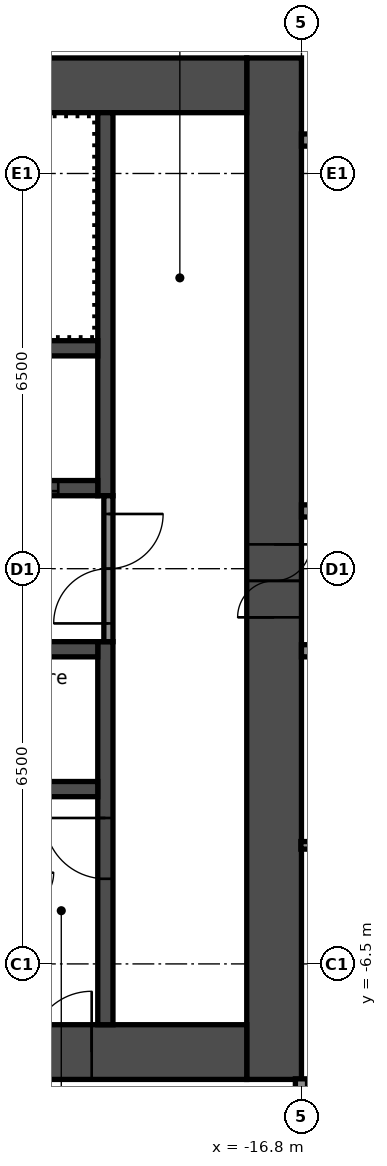
"""IFC4 building model, lengths in metres.
Left out: names, types, materials, properties, quantities, classifications, styles, units other than length and angle.
Written with IfcOpenShell. Run it as: python <this file> out.ifc"""

import sys

from ifc_helpers import new_model, si_unit, direction, frame, frame_2d, origin, place, context, subcontext, project, spatial, rectangle, extrude, element, fill, save


model = new_model("IFC4")
c1 = context("Model", 3, precision=1e-05, world=origin(), true_north=direction((0.0, 1.0)))
c2 = subcontext(c1, "Body", "Model", "MODEL_VIEW")
j1 = project(units=[si_unit("LENGTHUNIT", "METRE"), si_unit("PLANEANGLEUNIT", "RADIAN")], contexts=[c1])
p1 = place(None, origin())
s1 = spatial("IfcSite", under=j1, at=p1, CompositionType="ELEMENT")
p2 = place(p1, origin())
s2 = spatial("IfcBuilding", under=s1, at=p2, CompositionType="ELEMENT")
p3 = place(p2, frame((0.0, 0.0, 104.2)))
s3 = spatial("IfcBuildingStorey", under=s2, at=p3, CompositionType="ELEMENT", Elevation=104.2)
p4 = place(p3, frame((-17.25, -8.4, 0.0), z_axis=(0.0, 0.0, 1.0), x_axis=(0.0, 1.0, 0.0)))
e1 = element("IfcWall", 1, at=p4, inside=s3, PredefinedType="SHEAR", context=c2, shape_type="SweptSolid", body=[
    extrude(rectangle(XDim=16.8, YDim=0.9, at=frame_2d((8.4, 0.0))), origin(), (0.0, 0.0, 1.0), 2.8),
])
p5 = place(p4, frame((7.6, 0.0, 0.0)))
e2 = element("IfcOpeningElement", 2, at=p5, cuts=e1, PredefinedType="OPENING", context=c2, shape_type="SweptSolid", body=[
    extrude(rectangle(XDim=1.2, YDim=2.1, at=frame_2d((0.6, 1.05))), frame((0.0, 0.46, 0.0), z_axis=(0.0, -1.0, 0.0), x_axis=(1.0, 0.0, 0.0)), (0.0, 0.0, 1.0), 0.92),
])
p6 = place(p3, frame((-32.7, 7.95, 0.0), z_axis=(0.0, 0.0, 1.0), x_axis=(1.0, 0.0, 0.0)))
e3 = element("IfcWall", 3, at=p6, inside=s3, PredefinedType="SHEAR", context=c2, shape_type="SweptSolid", body=[
    extrude(rectangle(XDim=15.0, YDim=0.9, at=frame_2d((7.5, 0.0))), origin(), (0.0, 0.0, 1.0), 2.8),
])
p7 = place(p6, frame((3.4, 0.0, 0.0)))
e4 = element("IfcOpeningElement", 4, at=p7, cuts=e3, PredefinedType="OPENING", context=c2, shape_type="SweptSolid", body=[
    extrude(rectangle(XDim=1.2, YDim=2.1, at=frame_2d((0.6, 1.05))), frame((0.0, 0.46, 0.0), z_axis=(0.0, -1.0, 0.0), x_axis=(1.0, 0.0, 0.0)), (0.0, 0.0, 1.0), 0.92),
])
p8 = place(p6, frame((0.75, 0.0, 0.0)))
e5 = element("IfcOpeningElement", 5, at=p8, cuts=e3, PredefinedType="OPENING", context=c2, shape_type="SweptSolid", body=[
    extrude(rectangle(XDim=0.9, YDim=2.1, at=frame_2d((0.45, 1.05))), frame((0.0, 0.46, 0.0), z_axis=(0.0, -1.0, 0.0), x_axis=(1.0, 0.0, 0.0)), (0.0, 0.0, 1.0), 0.92),
])
p9 = place(p3, frame((-32.7, -7.95, 0.0), z_axis=(0.0, 0.0, 1.0), x_axis=(1.0, 0.0, 0.0)))
e6 = element("IfcWall", 6, at=p9, inside=s3, PredefinedType="SHEAR", context=c2, shape_type="SweptSolid", body=[
    extrude(rectangle(XDim=15.0, YDim=0.9, at=frame_2d((7.5, 0.0))), origin(), (0.0, 0.0, 1.0), 2.8),
])
p10 = place(p9, frame((11.45, 0.0, 0.0)))
e7 = element("IfcOpeningElement", 7, at=p10, cuts=e6, PredefinedType="OPENING", context=c2, shape_type="SweptSolid", body=[
    extrude(rectangle(XDim=1.0, YDim=2.1, at=frame_2d((0.5, 1.05))), frame((0.0, 0.46, 0.0), z_axis=(0.0, -1.0, 0.0), x_axis=(1.0, 0.0, 0.0)), (0.0, 0.0, 1.0), 0.92),
])
p11 = place(p3, frame((-20.025, 1.2, 0.0), z_axis=(0.0, 0.0, 1.0), x_axis=(0.0, 1.0, 0.0)))
e8 = element("IfcWall", 8, at=p11, inside=s3, PredefinedType="SHEAR", context=c2, shape_type="SweptSolid", body=[
    extrude(rectangle(XDim=6.3, YDim=0.25, at=frame_2d((3.15, 0.0))), origin(), (0.0, 0.0, 1.0), 2.8),
])
p12 = place(p3, frame((-20.025, -7.5, 0.0), z_axis=(0.0, 0.0, 1.0), x_axis=(0.0, 1.0, 0.0)))
e9 = element("IfcWall", 9, at=p12, inside=s3, PredefinedType="SHEAR", context=c2, shape_type="SweptSolid", body=[
    extrude(rectangle(XDim=6.3, YDim=0.25, at=frame_2d((3.15, 0.0))), origin(), (0.0, 0.0, 1.0), 2.8),
])
p13 = place(p12, frame((2.4, 0.0, 0.0)))
e10 = element("IfcOpeningElement", 10, at=p13, cuts=e9, PredefinedType="OPENING", context=c2, shape_type="SweptSolid", body=[
    extrude(rectangle(XDim=1.0, YDim=2.1, at=frame_2d((0.5, 1.05))), frame((0.0, 0.135, 0.0), z_axis=(0.0, -1.0, 0.0), x_axis=(1.0, 0.0, 0.0)), (0.0, 0.0, 1.0), 0.27),
])
p14 = place(p3, frame((-27.65, 1.325, 0.0), z_axis=(0.0, 0.0, 1.0), x_axis=(1.0, 0.0, 0.0)))
e11 = element("IfcWall", 11, at=p14, inside=s3, PredefinedType="SHEAR", context=c2, shape_type="SweptSolid", body=[
    extrude(rectangle(XDim=7.5, YDim=0.25, at=frame_2d((3.75, 0.0))), origin(), (0.0, 0.0, 1.0), 2.8),
])
p15 = place(p14, frame((5.75, 0.0, 0.0)))
e12 = element("IfcOpeningElement", 12, at=p15, cuts=e11, PredefinedType="OPENING", context=c2, shape_type="SweptSolid", body=[
    extrude(rectangle(XDim=1.1, YDim=2.1, at=frame_2d((0.55, 1.05))), frame((0.0, 0.135, 0.0), z_axis=(0.0, -1.0, 0.0), x_axis=(1.0, 0.0, 0.0)), (0.0, 0.0, 1.0), 0.27),
])
p16 = place(p14, frame((3.35, 0.0, 0.0)))
e13 = element("IfcOpeningElement", 13, at=p16, cuts=e11, PredefinedType="OPENING", context=c2, shape_type="SweptSolid", body=[
    extrude(rectangle(XDim=1.1, YDim=2.1, at=frame_2d((0.55, 1.05))), frame((0.0, 0.135, 0.0), z_axis=(0.0, -1.0, 0.0), x_axis=(1.0, 0.0, 0.0)), (0.0, 0.0, 1.0), 0.27),
])
p17 = place(p14, frame((0.95, 0.0, 0.0)))
e14 = element("IfcOpeningElement", 14, at=p17, cuts=e11, PredefinedType="OPENING", context=c2, shape_type="SweptSolid", body=[
    extrude(rectangle(XDim=1.1, YDim=2.1, at=frame_2d((0.55, 1.05))), frame((0.0, 0.135, 0.0), z_axis=(0.0, -1.0, 0.0), x_axis=(1.0, 0.0, 0.0)), (0.0, 0.0, 1.0), 0.27),
])
for number, where, z_axis, x_axis in (
    (15, (-27.65, 3.625, 0.0), (0.0, 0.0, 1.0), (1.0, 0.0, 0.0)),
    (16, (-27.65, -1.325, 0.0), (0.0, 0.0, 1.0), (1.0, 0.0, 0.0)),
    (17, (-27.65, -3.625, 0.0), (0.0, 0.0, 1.0), (1.0, 0.0, 0.0)),
):
    element("IfcWall", number, at=place(p3, frame(where, z_axis=z_axis, x_axis=x_axis)), inside=s3, PredefinedType="SHEAR", context=c2, shape_type="SweptSolid", body=[
        extrude(rectangle(XDim=7.5, YDim=0.25, at=frame_2d((3.75, 0.0))), origin(), (0.0, 0.0, 1.0), 2.8),
    ])
p18 = place(p3, frame((-19.975, -1.2, 0.0), z_axis=(0.0, 0.0, 1.0), x_axis=(0.0, 1.0, 0.0)))
e18 = element("IfcWall", 18, at=p18, inside=s3, PredefinedType="PARTITIONING", context=c2, shape_type="SweptSolid", body=[
    extrude(rectangle(XDim=2.4, YDim=0.15, at=frame_2d((1.2, 0.0))), origin(), (0.0, 0.0, 1.0), 2.8),
])
p19 = place(p18, frame((0.3, 0.0, 0.0)))
e19 = element("IfcOpeningElement", 19, at=p19, cuts=e18, PredefinedType="OPENING", context=c2, shape_type="SweptSolid", body=[
    extrude(rectangle(XDim=1.8, YDim=2.1, at=frame_2d((0.9, 1.05))), frame((0.0, 0.085, 0.0), z_axis=(0.0, -1.0, 0.0), x_axis=(1.0, 0.0, 0.0)), (0.0, 0.0, 1.0), 0.17),
])
p20 = place(p3, frame((-16.81, -4.55, 0.0), z_axis=(0.0, 0.0, 1.0), x_axis=(1.0, 0.0, 0.0)))
e20 = element("IfcWall", 20, at=p20, inside=s3, PredefinedType="PARTITIONING", context=c2, shape_type="SweptSolid", body=[
    extrude(rectangle(XDim=2.948, YDim=0.125, at=frame_2d((1.474, 0.0))), origin(), (0.0, 0.0, 1.0), 2.8),
])
p21 = place(p20, frame((1.11, 0.0, 0.0)))
e21 = element("IfcOpeningElement", 21, at=p21, cuts=e20, PredefinedType="OPENING", context=c2, shape_type="SweptSolid", body=[
    extrude(rectangle(XDim=0.8, YDim=2.1, at=frame_2d((0.4, 1.05))), frame((0.0, 0.073, 0.0), z_axis=(0.0, -1.0, 0.0), x_axis=(1.0, 0.0, 0.0)), (0.0, 0.0, 1.0), 0.145),
])
p22 = place(p3, frame((-16.8, -1.35, 0.0), z_axis=(0.0, 0.0, 1.0), x_axis=(1.0, 0.0, 0.0)))
e22 = element("IfcWall", 22, at=p22, inside=s3, PredefinedType="PARTITIONING", context=c2, shape_type="SweptSolid", body=[
    extrude(rectangle(XDim=33.6, YDim=0.2, at=frame_2d((16.8, 0.0))), origin(), (0.0, 0.0, 1.0), 2.8),
])
p23 = place(p22, frame((5.8, 0.0, 0.0)))
e23 = element("IfcOpeningElement", 23, at=p23, cuts=e22, PredefinedType="OPENING", context=c2, shape_type="SweptSolid", body=[
    extrude(rectangle(XDim=1.0, YDim=2.1, at=frame_2d((0.5, 1.05))), frame((0.0, 0.11, 0.0), z_axis=(0.0, -1.0, 0.0), x_axis=(1.0, 0.0, 0.0)), (0.0, 0.0, 1.0), 0.22),
])
p24 = place(p22, frame((10.0, 0.0, 0.0)))
e24 = element("IfcOpeningElement", 24, at=p24, cuts=e22, PredefinedType="OPENING", context=c2, shape_type="SweptSolid", body=[
    extrude(rectangle(XDim=1.0, YDim=2.1, at=frame_2d((0.5, 1.05))), frame((0.0, 0.11, 0.0), z_axis=(0.0, -1.0, 0.0), x_axis=(1.0, 0.0, 0.0)), (0.0, 0.0, 1.0), 0.22),
])
p25 = place(p22, frame((18.4, 0.0, 0.0)))
e25 = element("IfcOpeningElement", 25, at=p25, cuts=e22, PredefinedType="OPENING", context=c2, shape_type="SweptSolid", body=[
    extrude(rectangle(XDim=1.0, YDim=2.1, at=frame_2d((0.5, 1.05))), frame((0.0, 0.11, 0.0), z_axis=(0.0, -1.0, 0.0), x_axis=(1.0, 0.0, 0.0)), (0.0, 0.0, 1.0), 0.22),
])
p26 = place(p22, frame((26.8, 0.0, 0.0)))
e26 = element("IfcOpeningElement", 26, at=p26, cuts=e22, PredefinedType="OPENING", context=c2, shape_type="SweptSolid", body=[
    extrude(rectangle(XDim=1.0, YDim=2.1, at=frame_2d((0.5, 1.05))), frame((0.0, 0.11, 0.0), z_axis=(0.0, -1.0, 0.0), x_axis=(1.0, 0.0, 0.0)), (0.0, 0.0, 1.0), 0.22),
])
p27 = place(p3, frame((-16.8, 0.95, 0.0), z_axis=(0.0, 0.0, 1.0), x_axis=(1.0, 0.0, 0.0)))
e27 = element("IfcWall", 27, at=p27, inside=s3, PredefinedType="PARTITIONING", context=c2, shape_type="SweptSolid", body=[
    extrude(rectangle(XDim=33.6, YDim=0.2, at=frame_2d((16.8, 0.0))), origin(), (0.0, 0.0, 1.0), 2.8),
])
p28 = place(p27, frame((9.46, 0.0, 0.0)))
e28 = element("IfcOpeningElement", 28, at=p28, cuts=e27, PredefinedType="OPENING", context=c2, shape_type="SweptSolid", body=[
    extrude(rectangle(XDim=0.9, YDim=2.1, at=frame_2d((0.45, 1.05))), frame((0.0, 0.11, 0.0), z_axis=(0.0, -1.0, 0.0), x_axis=(1.0, 0.0, 0.0)), (0.0, 0.0, 1.0), 0.22),
])
p29 = place(p27, frame((13.66, 0.0, 0.0)))
e29 = element("IfcOpeningElement", 29, at=p29, cuts=e27, PredefinedType="OPENING", context=c2, shape_type="SweptSolid", body=[
    extrude(rectangle(XDim=0.9, YDim=2.1, at=frame_2d((0.45, 1.05))), frame((0.0, 0.11, 0.0), z_axis=(0.0, -1.0, 0.0), x_axis=(1.0, 0.0, 0.0)), (0.0, 0.0, 1.0), 0.22),
])
p30 = place(p27, frame((26.515, 0.0, 0.0)))
e30 = element("IfcOpeningElement", 30, at=p30, cuts=e27, PredefinedType="OPENING", context=c2, shape_type="SweptSolid", body=[
    extrude(rectangle(XDim=0.9, YDim=2.1, at=frame_2d((0.45, 1.05))), frame((0.0, 0.11, 0.0), z_axis=(0.0, -1.0, 0.0), x_axis=(1.0, 0.0, 0.0)), (0.0, 0.0, 1.0), 0.22),
])
p31 = place(p27, frame((30.715, 0.0, 0.0)))
e31 = element("IfcOpeningElement", 31, at=p31, cuts=e27, PredefinedType="OPENING", context=c2, shape_type="SweptSolid", body=[
    extrude(rectangle(XDim=0.9, YDim=2.1, at=frame_2d((0.45, 1.05))), frame((0.0, 0.11, 0.0), z_axis=(0.0, -1.0, 0.0), x_axis=(1.0, 0.0, 0.0)), (0.0, 0.0, 1.0), 0.22),
])
p32 = place(p3, frame((-16.8, 7.05, 0.0), z_axis=(0.0, 0.0, 1.0), x_axis=(1.0, 0.0, 0.0)))
e32 = element("IfcWall", 32, at=p32, inside=s3, PredefinedType="PARTITIONING", context=c2, shape_type="SweptSolid", body=[
    extrude(rectangle(XDim=33.6, YDim=0.2, at=frame_2d((16.8, 0.0))), origin(), (0.0, 0.0, 1.0), 2.8),
])
p33 = place(p32, frame((1.985, 0.0, 0.0)))
e33 = element("IfcOpeningElement", 33, at=p33, cuts=e32, PredefinedType="OPENING", context=c2, shape_type="SweptSolid", body=[
    extrude(rectangle(XDim=0.9, YDim=2.1, at=frame_2d((0.45, 1.05))), frame((0.0, 0.11, 0.0), z_axis=(0.0, -1.0, 0.0), x_axis=(1.0, 0.0, 0.0)), (0.0, 0.0, 1.0), 0.22),
])
p34 = place(p32, frame((6.185, 0.0, 0.0)))
e34 = element("IfcOpeningElement", 34, at=p34, cuts=e32, PredefinedType="OPENING", context=c2, shape_type="SweptSolid", body=[
    extrude(rectangle(XDim=0.9, YDim=2.1, at=frame_2d((0.45, 1.05))), frame((0.0, 0.11, 0.0), z_axis=(0.0, -1.0, 0.0), x_axis=(1.0, 0.0, 0.0)), (0.0, 0.0, 1.0), 0.22),
])
p35 = place(p32, frame((18.7, 0.0, 0.0)))
e35 = element("IfcOpeningElement", 35, at=p35, cuts=e32, PredefinedType="OPENING", context=c2, shape_type="SweptSolid", body=[
    extrude(rectangle(XDim=0.9, YDim=2.1, at=frame_2d((0.45, 1.05))), frame((0.0, 0.11, 0.0), z_axis=(0.0, -1.0, 0.0), x_axis=(1.0, 0.0, 0.0)), (0.0, 0.0, 1.0), 0.22),
])
p36 = place(p32, frame((22.9, 0.0, 0.0)))
e36 = element("IfcOpeningElement", 36, at=p36, cuts=e32, PredefinedType="OPENING", context=c2, shape_type="SweptSolid", body=[
    extrude(rectangle(XDim=0.9, YDim=2.1, at=frame_2d((0.45, 1.05))), frame((0.0, 0.11, 0.0), z_axis=(0.0, -1.0, 0.0), x_axis=(1.0, 0.0, 0.0)), (0.0, 0.0, 1.0), 0.22),
])
p37 = place(p3, frame((-16.8, -15.55, 0.0), z_axis=(0.0, 0.0, 1.0), x_axis=(0.0, 1.0, 0.0)))
e37 = element("IfcWall", 37, at=p37, inside=s3, PredefinedType="PARTITIONING", context=c2, shape_type="SweptSolid", body=[
    extrude(rectangle(XDim=7.16, YDim=0.2, at=frame_2d((3.58, 0.0))), origin(), (0.0, 0.0, 1.0), 2.8),
])
p38 = place(p5, origin())
e38 = element("IfcDoor", 38, at=p38, inside=s3, OperationType="DOUBLE_DOOR_SINGLE_SWING", PredefinedType="DOOR", context=c2, shape_type="SweptSolid", body=[
    extrude(rectangle(XDim=1.2, YDim=2.1, at=frame_2d((0.6, 1.05))), frame((0.0, 0.025, 0.0), z_axis=(0.0, -1.0, 0.0), x_axis=(1.0, 0.0, 0.0)), (0.0, 0.0, 1.0), 0.05),
])
fill(e2, e38)
p39 = place(p10, origin())
e39 = element("IfcDoor", 39, at=p39, inside=s3, OperationType="SINGLE_SWING_LEFT", PredefinedType="DOOR", context=c2, shape_type="SweptSolid", body=[
    extrude(rectangle(XDim=1.0, YDim=2.1, at=frame_2d((0.5, 1.05))), frame((0.0, 0.025, 0.0), z_axis=(0.0, -1.0, 0.0), x_axis=(1.0, 0.0, 0.0)), (0.0, 0.0, 1.0), 0.05),
])
fill(e7, e39)
p40 = place(p13, origin())
e40 = element("IfcDoor", 40, at=p40, inside=s3, OperationType="SINGLE_SWING_LEFT", PredefinedType="DOOR", context=c2, shape_type="SweptSolid", body=[
    extrude(rectangle(XDim=1.0, YDim=2.1, at=frame_2d((0.5, 1.05))), frame((0.0, 0.025, 0.0), z_axis=(0.0, -1.0, 0.0), x_axis=(1.0, 0.0, 0.0)), (0.0, 0.0, 1.0), 0.05),
])
fill(e10, e40)
p41 = place(p19, origin())
e41 = element("IfcDoor", 41, at=p41, inside=s3, OperationType="DOUBLE_DOOR_SINGLE_SWING", PredefinedType="DOOR", context=c2, shape_type="SweptSolid", body=[
    extrude(rectangle(XDim=1.8, YDim=2.1, at=frame_2d((0.9, 1.05))), frame((0.0, 0.025, 0.0), z_axis=(0.0, -1.0, 0.0), x_axis=(1.0, 0.0, 0.0)), (0.0, 0.0, 1.0), 0.05),
])
fill(e19, e41)
p42 = place(p15, origin())
e42 = element("IfcDoor", 42, at=p42, inside=s3, OperationType="DOUBLE_DOOR_SLIDING", PredefinedType="DOOR", context=c2, shape_type="SweptSolid", body=[
    extrude(rectangle(XDim=1.1, YDim=2.1, at=frame_2d((0.55, 1.05))), frame((0.0, 0.025, 0.0), z_axis=(0.0, -1.0, 0.0), x_axis=(1.0, 0.0, 0.0)), (0.0, 0.0, 1.0), 0.05),
])
fill(e12, e42)
save(model, sys.argv[1])
